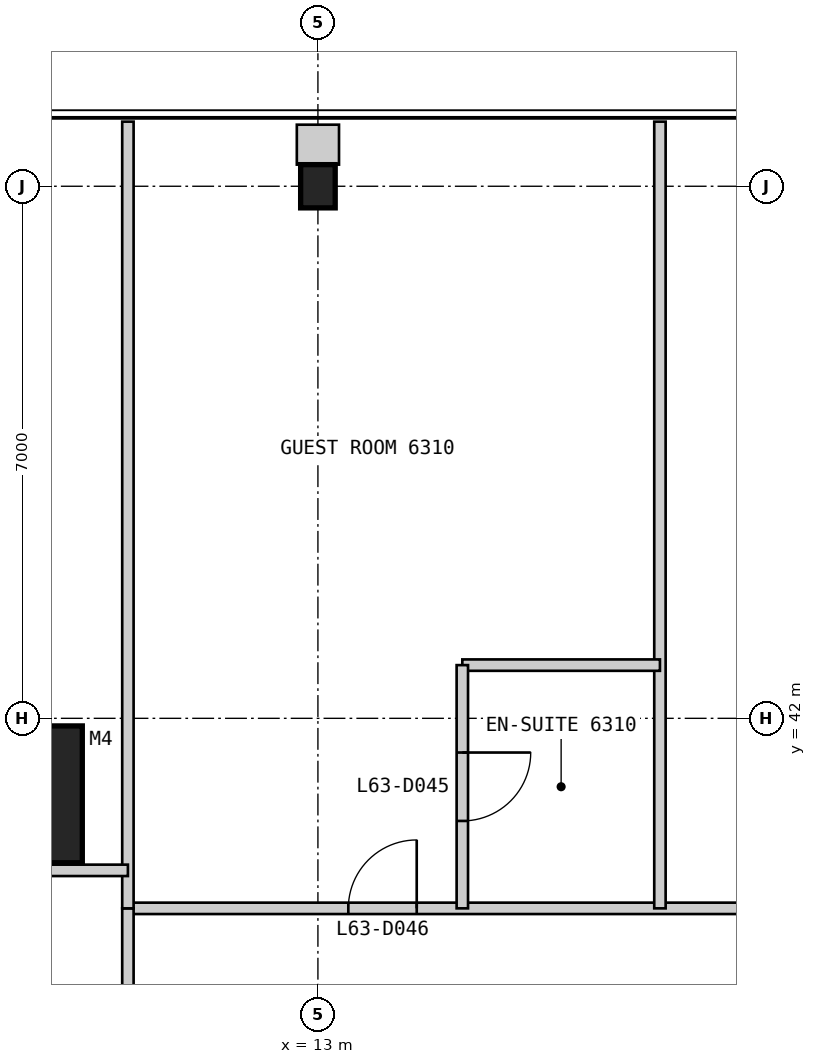
"""IFC4 building model, lengths in metres.
Left out: names, types, materials, properties, quantities, classifications, styles, units other than length and angle.
Written with IfcOpenShell. Run it as: python <this file> out.ifc"""

import sys

from ifc_helpers import new_model, si_unit, direction, frame, frame_2d, origin, origin_2d, place, context, subcontext, project, spatial, rectangle, i_section, extrude, element, fill, save


model = new_model("IFC4")
c1 = context("Model", 3, precision=1e-05, world=origin(), true_north=direction((0.0, 1.0)))
c2 = subcontext(c1, "Body", "Model", "MODEL_VIEW")
j1 = project(units=[si_unit("LENGTHUNIT", "METRE"), si_unit("PLANEANGLEUNIT", "RADIAN")], contexts=[c1])
p1 = place(None, origin())
s1 = spatial("IfcSite", under=j1, at=p1, CompositionType="ELEMENT")
p2 = place(p1, origin())
s2 = spatial("IfcBuilding", under=s1, at=p2, CompositionType="ELEMENT")
p3 = place(p2, frame((0.0, 0.0, 266.2)))
s3 = spatial("IfcBuildingStorey", under=s2, at=p3, CompositionType="ELEMENT", Elevation=266.2)
p4 = place(p3, frame((9.0, 41.0, 0.0), z_axis=(0.0, 0.0, 1.0), x_axis=(1.0, 0.0, 0.0)))
e1 = element("IfcColumn", 1, at=p4, inside=s3, PredefinedType="COLUMN", context=c2, shape_type="SweptSolid", body=[
    extrude(rectangle(XDim=1.8, YDim=1.8, at=origin_2d()), origin(), (0.0, 0.0, 1.0), 3.4),
])
p5 = place(p3, frame((13.0, 49.0, 0.0), z_axis=(0.0, 0.0, 1.0), x_axis=(1.0, 0.0, 0.0)))
e2 = element("IfcColumn", 2, at=p5, inside=s3, PredefinedType="COLUMN", context=c2, shape_type="SweptSolid", body=[
    extrude(i_section(OverallWidth=0.455, OverallDepth=0.569, WebThickness=0.078, FlangeThickness=0.125, at=origin_2d()), origin(), (0.0, 0.0, 1.0), 3.4),
])
p6 = place(p3, frame((39.5, 39.5, 0.0), z_axis=(0.0, 0.0, 1.0), x_axis=(-1.0, 0.0, 0.0)))
e3 = element("IfcWall", 3, at=p6, inside=s3, PredefinedType="PARTITIONING", context=c2, shape_type="SweptSolid", body=[
    extrude(rectangle(XDim=29.0, YDim=0.15, at=frame_2d((14.5, 0.0))), origin(), (0.0, 0.0, 1.0), 3.25),
])
p7 = place(p6, frame((2.575, 0.0, 0.0)))
e4 = element("IfcOpeningElement", 4, at=p7, cuts=e3, PredefinedType="OPENING", context=c2, shape_type="SweptSolid", body=[
    extrude(rectangle(XDim=0.9, YDim=2.1, at=frame_2d((0.45, 1.05))), frame((0.0, 0.085, 0.0), z_axis=(0.0, -1.0, 0.0), x_axis=(1.0, 0.0, 0.0)), (0.0, 0.0, 1.0), 0.17),
])
p8 = place(p6, frame((7.8, 0.0, 0.0)))
e5 = element("IfcOpeningElement", 5, at=p8, cuts=e3, PredefinedType="OPENING", context=c2, shape_type="SweptSolid", body=[
    extrude(rectangle(XDim=1.0, YDim=2.1, at=frame_2d((0.5, 1.05))), frame((0.0, 0.085, 0.0), z_axis=(0.0, -1.0, 0.0), x_axis=(1.0, 0.0, 0.0)), (0.0, 0.0, 1.0), 0.17),
])
p9 = place(p6, frame((13.6, 0.0, 0.0)))
e6 = element("IfcOpeningElement", 6, at=p9, cuts=e3, PredefinedType="OPENING", context=c2, shape_type="SweptSolid", body=[
    extrude(rectangle(XDim=0.9, YDim=2.1, at=frame_2d((0.45, 1.05))), frame((0.0, 0.085, 0.0), z_axis=(0.0, -1.0, 0.0), x_axis=(1.0, 0.0, 0.0)), (0.0, 0.0, 1.0), 0.17),
])
p10 = place(p6, frame((25.2, 0.0, 0.0)))
e7 = element("IfcOpeningElement", 7, at=p10, cuts=e3, PredefinedType="OPENING", context=c2, shape_type="SweptSolid", body=[
    extrude(rectangle(XDim=0.9, YDim=2.1, at=frame_2d((0.45, 1.05))), frame((0.0, 0.085, 0.0), z_axis=(0.0, -1.0, 0.0), x_axis=(1.0, 0.0, 0.0)), (0.0, 0.0, 1.0), 0.17),
])
p11 = place(p3, frame((17.5, 49.85, 0.0), z_axis=(0.0, 0.0, 1.0), x_axis=(0.0, -1.0, 0.0)))
e8 = element("IfcWall", 8, at=p11, inside=s3, PredefinedType="PARTITIONING", context=c2, shape_type="SweptSolid", body=[
    extrude(rectangle(XDim=10.35, YDim=0.15, at=frame_2d((5.175, 0.0))), origin(), (0.0, 0.0, 1.0), 3.25),
])
p12 = place(p3, frame((17.5, 42.7, 0.0), z_axis=(0.0, 0.0, 1.0), x_axis=(-1.0, 0.0, 0.0)))
e9 = element("IfcWall", 9, at=p12, inside=s3, PredefinedType="PARTITIONING", context=c2, shape_type="SweptSolid", body=[
    extrude(rectangle(XDim=2.6, YDim=0.15, at=frame_2d((1.3, 0.0))), origin(), (0.0, 0.0, 1.0), 3.25),
])
p13 = place(p3, frame((14.9, 42.7, 0.0), z_axis=(0.0, 0.0, 1.0), x_axis=(0.0, -1.0, 0.0)))
e10 = element("IfcWall", 10, at=p13, inside=s3, PredefinedType="PARTITIONING", context=c2, shape_type="SweptSolid", body=[
    extrude(rectangle(XDim=3.2, YDim=0.15, at=frame_2d((1.6, 0.0))), origin(), (0.0, 0.0, 1.0), 3.25),
])
p14 = place(p13, frame((1.15, 0.0, 0.0)))
e11 = element("IfcOpeningElement", 11, at=p14, cuts=e10, PredefinedType="OPENING", context=c2, shape_type="SweptSolid", body=[
    extrude(rectangle(XDim=0.9, YDim=2.1, at=frame_2d((0.45, 1.05))), frame((0.0, 0.085, 0.0), z_axis=(0.0, -1.0, 0.0), x_axis=(1.0, 0.0, 0.0)), (0.0, 0.0, 1.0), 0.17),
])
p15 = place(p3, frame((10.5, 39.5, 0.0), z_axis=(0.0, 0.0, 1.0), x_axis=(0.0, -1.0, 0.0)))
e12 = element("IfcWall", 12, at=p15, inside=s3, PredefinedType="PARTITIONING", context=c2, shape_type="SweptSolid", body=[
    extrude(rectangle(XDim=29.0, YDim=0.15, at=frame_2d((14.5, 0.0))), origin(), (0.0, 0.0, 1.0), 3.25),
])
p16 = place(p15, frame((2.4, 0.0, 0.0)))
e13 = element("IfcOpeningElement", 13, at=p16, cuts=e12, PredefinedType="OPENING", context=c2, shape_type="SweptSolid", body=[
    extrude(rectangle(XDim=0.9, YDim=2.1, at=frame_2d((0.45, 1.05))), frame((0.0, 0.085, 0.0), z_axis=(0.0, -1.0, 0.0), x_axis=(1.0, 0.0, 0.0)), (0.0, 0.0, 1.0), 0.17),
])
p17 = place(p15, frame((7.2, 0.0, 0.0)))
e14 = element("IfcOpeningElement", 14, at=p17, cuts=e12, PredefinedType="OPENING", context=c2, shape_type="SweptSolid", body=[
    extrude(rectangle(XDim=0.9, YDim=2.1, at=frame_2d((0.45, 1.05))), frame((0.0, 0.085, 0.0), z_axis=(0.0, -1.0, 0.0), x_axis=(1.0, 0.0, 0.0)), (0.0, 0.0, 1.0), 0.17),
])
p18 = place(p15, frame((13.6, 0.0, 0.0)))
e15 = element("IfcOpeningElement", 15, at=p18, cuts=e12, PredefinedType="OPENING", context=c2, shape_type="SweptSolid", body=[
    extrude(rectangle(XDim=0.9, YDim=2.1, at=frame_2d((0.45, 1.05))), frame((0.0, 0.085, 0.0), z_axis=(0.0, -1.0, 0.0), x_axis=(1.0, 0.0, 0.0)), (0.0, 0.0, 1.0), 0.17),
])
p19 = place(p15, frame((25.2, 0.0, 0.0)))
e16 = element("IfcOpeningElement", 16, at=p19, cuts=e12, PredefinedType="OPENING", context=c2, shape_type="SweptSolid", body=[
    extrude(rectangle(XDim=0.9, YDim=2.1, at=frame_2d((0.45, 1.05))), frame((0.0, 0.085, 0.0), z_axis=(0.0, -1.0, 0.0), x_axis=(1.0, 0.0, 0.0)), (0.0, 0.0, 1.0), 0.17),
])
p20 = place(p3, frame((10.5, 49.85, 0.0), z_axis=(0.0, 0.0, 1.0), x_axis=(0.0, -1.0, 0.0)))
e17 = element("IfcWall", 17, at=p20, inside=s3, PredefinedType="PARTITIONING", context=c2, shape_type="SweptSolid", body=[
    extrude(rectangle(XDim=10.35, YDim=0.15, at=frame_2d((5.175, 0.0))), origin(), (0.0, 0.0, 1.0), 3.25),
])
p21 = place(p3, frame((7.9, 40.0, 0.0), z_axis=(0.0, 0.0, 1.0), x_axis=(1.0, 0.0, 0.0)))
e18 = element("IfcWall", 18, at=p21, inside=s3, PredefinedType="PARTITIONING", context=c2, shape_type="SweptSolid", body=[
    extrude(rectangle(XDim=2.6, YDim=0.15, at=frame_2d((1.3, 0.0))), origin(), (0.0, 0.0, 1.0), 3.25),
])
p22 = place(p3, frame((13.0, 49.81, 0.0), z_axis=(0.0, 0.0, 1.0), x_axis=(0.0, -1.0, 0.0)))
e19 = element("IfcWall", 19, at=p22, inside=s3, PredefinedType="PARTITIONING", context=c2, shape_type="SweptSolid", body=[
    extrude(rectangle(XDim=0.526, YDim=0.555, at=frame_2d((0.263, 0.0))), origin(), (0.0, 0.0, 1.0), 3.25),
])
p23 = place(p14, origin())
e20 = element("IfcDoor", 20, at=p23, inside=s3, OperationType="SINGLE_SWING_LEFT", PredefinedType="DOOR", context=c2, shape_type="SweptSolid", body=[
    extrude(rectangle(XDim=0.9, YDim=2.1, at=frame_2d((0.45, 1.05))), frame((0.0, 0.025, 0.0), z_axis=(0.0, -1.0, 0.0), x_axis=(1.0, 0.0, 0.0)), (0.0, 0.0, 1.0), 0.05),
])
fill(e11, e20)
p24 = place(p10, frame((0.9, 0.0, 0.0), z_axis=(0.0, 0.0, 1.0), x_axis=(-1.0, 0.0, 0.0)))
e21 = element("IfcDoor", 21, at=p24, inside=s3, OperationType="SINGLE_SWING_RIGHT", PredefinedType="DOOR", context=c2, shape_type="SweptSolid", body=[
    extrude(rectangle(XDim=0.9, YDim=2.1, at=frame_2d((0.45, 1.05))), frame((0.0, 0.025, 0.0), z_axis=(0.0, -1.0, 0.0), x_axis=(1.0, 0.0, 0.0)), (0.0, 0.0, 1.0), 0.05),
])
fill(e7, e21)
save(model, sys.argv[1])
